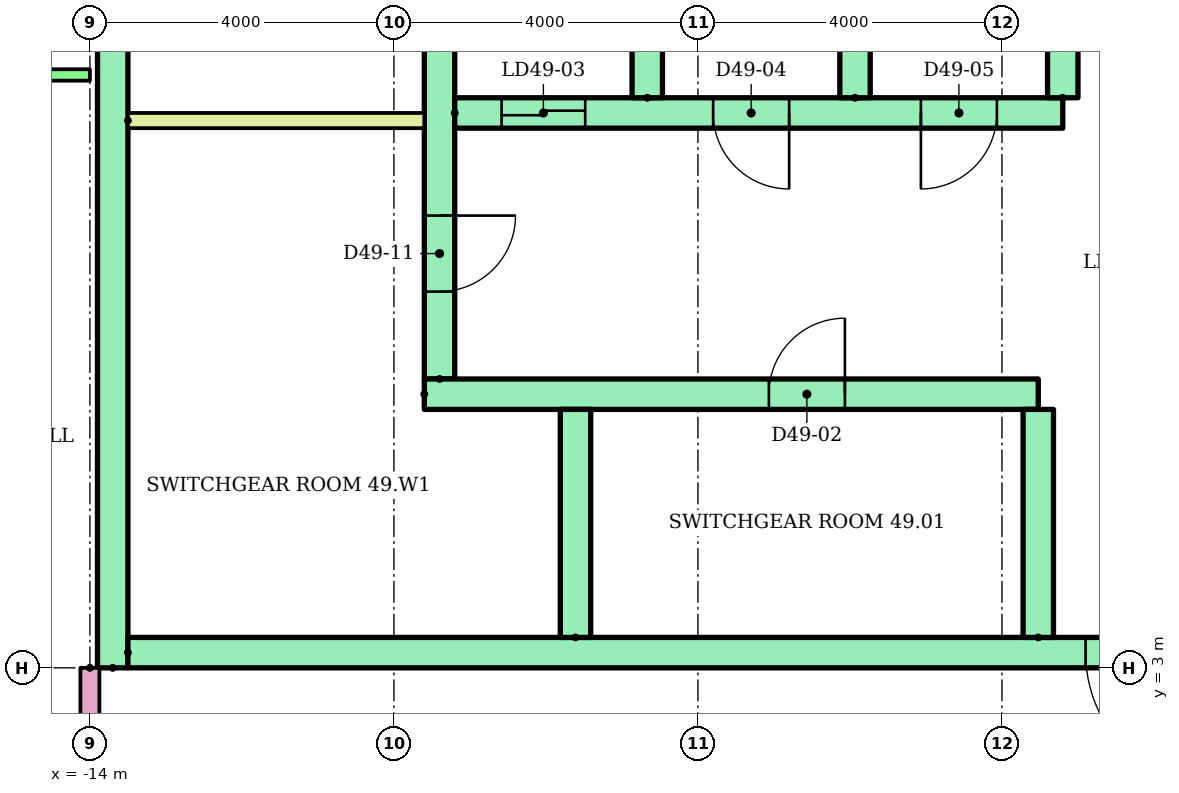
"""IFC4 building model, lengths in metres.
Left out: names, types, materials, properties, quantities, classifications, styles, units other than length and angle.
Written with IfcOpenShell. Run it as: python <this file> out.ifc"""

import sys

from ifc_helpers import new_model, si_unit, direction, frame, frame_2d, origin, place, context, subcontext, project, spatial, rectangle, extrude, element, fill, save


model = new_model("IFC4")
c1 = context("Model", 3, precision=1e-05, world=origin(), true_north=direction((0.0, 1.0)))
c2 = subcontext(c1, "Body", "Model", "MODEL_VIEW")
j1 = project(units=[si_unit("LENGTHUNIT", "METRE"), si_unit("PLANEANGLEUNIT", "RADIAN")], contexts=[c1])
p1 = place(None, origin())
s1 = spatial("IfcSite", under=j1, at=p1, CompositionType="ELEMENT")
p2 = place(p1, origin())
s2 = spatial("IfcBuilding", under=s1, at=p2, CompositionType="ELEMENT")
p3 = place(p2, frame((0.0, 0.0, 187.7)))
s3 = spatial("IfcBuildingStorey", under=s2, at=p3, CompositionType="ELEMENT", Elevation=187.7)
p4 = place(p3, frame((-13.7, 3.0, 0.0), z_axis=(0.0, 0.0, 1.0), x_axis=(0.0, 1.0, 0.0)))
e1 = element("IfcWall", 1, at=p4, inside=s3, PredefinedType="SHEAR", context=c2, shape_type="SweptSolid", body=[
    extrude(rectangle(XDim=17.0, YDim=0.4, at=frame_2d((8.5, 0.0))), origin(), (0.0, 0.0, 1.0), 2.92),
])
p5 = place(p3, frame((-9.4, 6.8, 0.0), z_axis=(0.0, 0.0, 1.0), x_axis=(0.0, 1.0, 0.0)))
e2 = element("IfcWall", 2, at=p5, inside=s3, PredefinedType="SHEAR", context=c2, shape_type="SweptSolid", body=[
    extrude(rectangle(XDim=12.7, YDim=0.4, at=frame_2d((6.35, 0.0))), origin(), (0.0, 0.0, 1.0), 2.92),
])
p6 = place(p5, frame((1.15, 0.0, 0.0)))
e3 = element("IfcOpeningElement", 3, at=p6, cuts=e2, PredefinedType="OPENING", context=c2, shape_type="SweptSolid", body=[
    extrude(rectangle(XDim=1.0, YDim=2.1, at=frame_2d((0.5, 1.05))), frame((0.0, 0.21, 0.0), z_axis=(0.0, -1.0, 0.0), x_axis=(1.0, 0.0, 0.0)), (0.0, 0.0, 1.0), 0.42),
])
p7 = place(p5, frame((7.925, 0.0, 0.0)))
e4 = element("IfcOpeningElement", 4, at=p7, cuts=e2, PredefinedType="OPENING", context=c2, shape_type="SweptSolid", body=[
    extrude(rectangle(XDim=1.0, YDim=2.1, at=frame_2d((0.5, 1.05))), frame((0.0, 0.21, 0.0), z_axis=(0.0, -1.0, 0.0), x_axis=(1.0, 0.0, 0.0)), (0.0, 0.0, 1.0), 0.42),
])
p8 = place(p3, frame((-13.5, 3.2, 0.0)))
e5 = element("IfcWall", 5, at=p8, inside=s3, PredefinedType="SHEAR", context=c2, shape_type="SweptSolid", body=[
    extrude(rectangle(XDim=27.0, YDim=0.4, at=frame_2d((13.5, 0.0))), origin(), (0.0, 0.0, 1.0), 2.92),
])
p9 = place(p8, frame((22.083, 0.0, 0.0)))
e6 = element("IfcOpeningElement", 6, at=p9, cuts=e5, PredefinedType="OPENING", context=c2, shape_type="SweptSolid", body=[
    extrude(rectangle(XDim=1.1, YDim=2.1, at=frame_2d((0.55, 1.05))), frame((0.0, 0.21, 0.0), z_axis=(0.0, -1.0, 0.0), x_axis=(1.0, 0.0, 0.0)), (0.0, 0.0, 1.0), 0.42),
])
p10 = place(p8, frame((25.128, 0.0, 0.0)))
e7 = element("IfcOpeningElement", 7, at=p10, cuts=e5, PredefinedType="OPENING", context=c2, shape_type="SweptSolid", body=[
    extrude(rectangle(XDim=1.1, YDim=2.1, at=frame_2d((0.55, 1.05))), frame((0.0, 0.21, 0.0), z_axis=(0.0, -1.0, 0.0), x_axis=(1.0, 0.0, 0.0)), (0.0, 0.0, 1.0), 0.42),
])
p11 = place(p8, frame((12.6, 0.0, 0.0)))
e8 = element("IfcOpeningElement", 8, at=p11, cuts=e5, PredefinedType="OPENING", context=c2, shape_type="SweptSolid", body=[
    extrude(rectangle(XDim=1.8, YDim=2.1, at=frame_2d((0.9, 1.05))), frame((0.0, 0.21, 0.0), z_axis=(0.0, -1.0, 0.0), x_axis=(1.0, 0.0, 0.0)), (0.0, 0.0, 1.0), 0.42),
])
p12 = place(p3, frame((-9.6, 6.6, 0.0)))
e9 = element("IfcWall", 9, at=p12, inside=s3, PredefinedType="SHEAR", context=c2, shape_type="SweptSolid", body=[
    extrude(rectangle(XDim=8.078, YDim=0.4, at=frame_2d((4.039, 0.0))), origin(), (0.0, 0.0, 1.0), 2.92),
])
p13 = place(p12, frame((4.533, 0.0, 0.0)))
e10 = element("IfcOpeningElement", 10, at=p13, cuts=e9, PredefinedType="OPENING", context=c2, shape_type="SweptSolid", body=[
    extrude(rectangle(XDim=1.0, YDim=2.1, at=frame_2d((0.5, 1.05))), frame((0.0, 0.21, 0.0), z_axis=(0.0, -1.0, 0.0), x_axis=(1.0, 0.0, 0.0)), (0.0, 0.0, 1.0), 0.42),
])
for number, where, z_axis, x_axis in (
    (11, (-7.611, 3.4, 0.0), (0.0, 0.0, 1.0), (0.0, 1.0, 0.0)),
    (12, (-1.522, 3.4, 0.0), (0.0, 0.0, 1.0), (0.0, 1.0, 0.0)),
):
    element("IfcWall", number, at=place(p3, frame(where, z_axis=z_axis, x_axis=x_axis)), inside=s3, PredefinedType="SHEAR", context=c2, shape_type="SweptSolid", body=[
        extrude(rectangle(XDim=3.0, YDim=0.4, at=frame_2d((1.5, 0.0))), origin(), (0.0, 0.0, 1.0), 2.92),
    ])
p14 = place(p3, frame((-9.2, 10.3, 0.0)))
e13 = element("IfcWall", 13, at=p14, inside=s3, PredefinedType="SHEAR", context=c2, shape_type="SweptSolid", body=[
    extrude(rectangle(XDim=8.0, YDim=0.4, at=frame_2d((4.0, 0.0))), origin(), (0.0, 0.0, 1.0), 2.92),
])
p15 = place(p14, frame((0.617, 0.0, 0.0)))
e14 = element("IfcOpeningElement", 14, at=p15, cuts=e13, PredefinedType="OPENING", context=c2, shape_type="SweptSolid", body=[
    extrude(rectangle(XDim=1.1, YDim=2.1, at=frame_2d((0.55, 1.05))), frame((0.0, 0.21, 0.0), z_axis=(0.0, -1.0, 0.0), x_axis=(1.0, 0.0, 0.0)), (0.0, 0.0, 1.0), 0.42),
])
p16 = place(p14, frame((3.4, 0.0, 0.0)))
e15 = element("IfcOpeningElement", 15, at=p16, cuts=e13, PredefinedType="OPENING", context=c2, shape_type="SweptSolid", body=[
    extrude(rectangle(XDim=1.0, YDim=2.1, at=frame_2d((0.5, 1.05))), frame((0.0, 0.21, 0.0), z_axis=(0.0, -1.0, 0.0), x_axis=(1.0, 0.0, 0.0)), (0.0, 0.0, 1.0), 0.42),
])
p17 = place(p14, frame((6.133, 0.0, 0.0)))
e16 = element("IfcOpeningElement", 16, at=p17, cuts=e13, PredefinedType="OPENING", context=c2, shape_type="SweptSolid", body=[
    extrude(rectangle(XDim=1.0, YDim=2.1, at=frame_2d((0.5, 1.05))), frame((0.0, 0.21, 0.0), z_axis=(0.0, -1.0, 0.0), x_axis=(1.0, 0.0, 0.0)), (0.0, 0.0, 1.0), 0.42),
])
for number, where, z_axis, x_axis in (
    (17, (-6.667, 10.5, 0.0), (0.0, 0.0, 1.0), (0.0, 1.0, 0.0)),
    (18, (-3.933, 10.5, 0.0), (0.0, 0.0, 1.0), (0.0, 1.0, 0.0)),
    (19, (-1.2, 10.5, 0.0), (0.0, 0.0, 1.0), (0.0, 1.0, 0.0)),
):
    element("IfcWall", number, at=place(p3, frame(where, z_axis=z_axis, x_axis=x_axis)), inside=s3, PredefinedType="SHEAR", context=c2, shape_type="SweptSolid", body=[
        extrude(rectangle(XDim=3.0, YDim=0.4, at=frame_2d((1.5, 0.0))), origin(), (0.0, 0.0, 1.0), 2.92),
    ])
p18 = place(p3, frame((-13.5, 10.2, 0.0)))
e20 = element("IfcWall", 20, at=p18, inside=s3, PredefinedType="PARTITIONING", context=c2, shape_type="SweptSolid", body=[
    extrude(rectangle(XDim=3.9, YDim=0.2, at=frame_2d((1.95, 0.0))), origin(), (0.0, 0.0, 1.0), 2.92),
])
p19 = place(p3, frame((-24.82, 10.8, 0.0)))
e21 = element("IfcWall", 21, at=p19, inside=s3, PredefinedType="PARTITIONING", context=c2, shape_type="SweptSolid", body=[
    extrude(rectangle(XDim=10.82, YDim=0.15, at=frame_2d((5.41, 0.0))), origin(), (0.0, 0.0, 1.0), 2.4),
])
p20 = place(p19, frame((1.273, 0.0, 0.0)))
e22 = element("IfcOpeningElement", 22, at=p20, cuts=e21, PredefinedType="OPENING", context=c2, shape_type="SweptSolid", body=[
    extrude(rectangle(XDim=1.0, YDim=2.1, at=frame_2d((0.5, 1.05))), frame((0.0, 0.085, 0.0), z_axis=(0.0, -1.0, 0.0), x_axis=(1.0, 0.0, 0.0)), (0.0, 0.0, 1.0), 0.17),
])
p21 = place(p19, frame((7.32, 0.0, 0.0)))
e23 = element("IfcOpeningElement", 23, at=p21, cuts=e21, PredefinedType="OPENING", context=c2, shape_type="SweptSolid", body=[
    extrude(rectangle(XDim=0.9, YDim=2.1, at=frame_2d((0.45, 1.05))), frame((0.0, 0.085, 0.0), z_axis=(0.0, -1.0, 0.0), x_axis=(1.0, 0.0, 0.0)), (0.0, 0.0, 1.0), 0.17),
])
p22 = place(p3, frame((-14.0, 3.0, 0.0), z_axis=(0.0, 0.0, 1.0), x_axis=(0.0, -1.0, 0.0)))
e24 = element("IfcWall", 24, at=p22, inside=s3, PredefinedType="PARTITIONING", context=c2, shape_type="SweptSolid", body=[
    extrude(rectangle(XDim=1.6, YDim=0.25, at=frame_2d((0.8, 0.0))), origin(), (0.0, 0.0, 1.0), 2.4),
])
p23 = place(p11, frame((1.8, 0.0, 0.0), z_axis=(0.0, 0.0, 1.0), x_axis=(-1.0, 0.0, 0.0)))
e25 = element("IfcDoor", 25, at=p23, inside=s3, OperationType="DOUBLE_DOOR_SINGLE_SWING", PredefinedType="DOOR", context=c2, shape_type="SweptSolid", body=[
    extrude(rectangle(XDim=1.8, YDim=2.1, at=frame_2d((0.9, 1.05))), frame((0.0, 0.025, 0.0), z_axis=(0.0, -1.0, 0.0), x_axis=(1.0, 0.0, 0.0)), (0.0, 0.0, 1.0), 0.05),
])
fill(e8, e25)
p24 = place(p13, origin())
e26 = element("IfcDoor", 26, at=p24, inside=s3, OperationType="SINGLE_SWING_RIGHT", PredefinedType="DOOR", context=c2, shape_type="SweptSolid", body=[
    extrude(rectangle(XDim=1.0, YDim=2.1, at=frame_2d((0.5, 1.05))), frame((0.0, 0.025, 0.0), z_axis=(0.0, -1.0, 0.0), x_axis=(1.0, 0.0, 0.0)), (0.0, 0.0, 1.0), 0.05),
])
fill(e10, e26)
p25 = place(p15, origin())
e27 = element("IfcDoor", 27, at=p25, inside=s3, OperationType="SLIDING_TO_LEFT", PredefinedType="DOOR", context=c2, shape_type="SweptSolid", body=[
    extrude(rectangle(XDim=1.1, YDim=2.1, at=frame_2d((0.55, 1.05))), frame((0.0, 0.025, 0.0), z_axis=(0.0, -1.0, 0.0), x_axis=(1.0, 0.0, 0.0)), (0.0, 0.0, 1.0), 0.05),
])
fill(e14, e27)
p26 = place(p16, frame((1.0, 0.0, 0.0), z_axis=(0.0, 0.0, 1.0), x_axis=(-1.0, 0.0, 0.0)))
e28 = element("IfcDoor", 28, at=p26, inside=s3, OperationType="SINGLE_SWING_RIGHT", PredefinedType="DOOR", context=c2, shape_type="SweptSolid", body=[
    extrude(rectangle(XDim=1.0, YDim=2.1, at=frame_2d((0.5, 1.05))), frame((0.0, 0.025, 0.0), z_axis=(0.0, -1.0, 0.0), x_axis=(1.0, 0.0, 0.0)), (0.0, 0.0, 1.0), 0.05),
])
fill(e15, e28)
p27 = place(p17, frame((1.0, 0.0, 0.0), z_axis=(0.0, 0.0, 1.0), x_axis=(-1.0, 0.0, 0.0)))
e29 = element("IfcDoor", 29, at=p27, inside=s3, OperationType="SINGLE_SWING_LEFT", PredefinedType="DOOR", context=c2, shape_type="SweptSolid", body=[
    extrude(rectangle(XDim=1.0, YDim=2.1, at=frame_2d((0.5, 1.05))), frame((0.0, 0.025, 0.0), z_axis=(0.0, -1.0, 0.0), x_axis=(1.0, 0.0, 0.0)), (0.0, 0.0, 1.0), 0.05),
])
fill(e16, e29)
p28 = place(p6, frame((1.0, 0.0, 0.0), z_axis=(0.0, 0.0, 1.0), x_axis=(-1.0, 0.0, 0.0)))
e30 = element("IfcDoor", 30, at=p28, inside=s3, OperationType="SINGLE_SWING_RIGHT", PredefinedType="DOOR", context=c2, shape_type="SweptSolid", body=[
    extrude(rectangle(XDim=1.0, YDim=2.1, at=frame_2d((0.5, 1.05))), frame((0.0, 0.025, 0.0), z_axis=(0.0, -1.0, 0.0), x_axis=(1.0, 0.0, 0.0)), (0.0, 0.0, 1.0), 0.05),
])
fill(e3, e30)
save(model, sys.argv[1])
